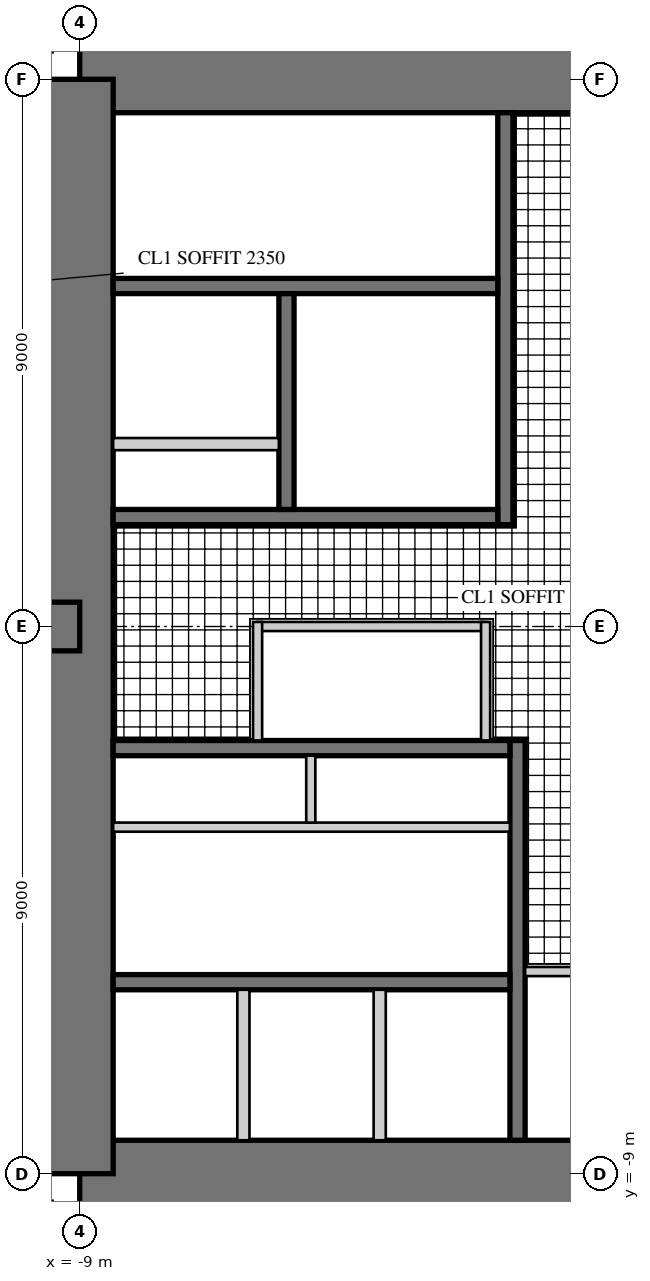
"""IFC4 building model, lengths in metres.
Left out: names, types, materials, properties, quantities, classifications, styles, units other than length and angle.
Written with IfcOpenShell. Run it as: python <this file> out.ifc"""

import sys

from ifc_helpers import new_model, si_unit, direction, frame, frame_2d, origin, place, context, subcontext, project, spatial, rectangle, extrude, element, fill, save


model = new_model("IFC4")
c1 = context("Model", 3, precision=1e-05, world=origin(), true_north=direction((0.0, 1.0)))
c2 = subcontext(c1, "Body", "Model", "MODEL_VIEW")
j1 = project(units=[si_unit("LENGTHUNIT", "METRE"), si_unit("PLANEANGLEUNIT", "RADIAN")], contexts=[c1])
p1 = place(None, origin())
s1 = spatial("IfcSite", under=j1, at=p1, CompositionType="ELEMENT")
p2 = place(p1, origin())
s2 = spatial("IfcBuilding", under=s1, at=p2, CompositionType="ELEMENT")
p3 = place(p2, frame((0.0, 0.0, 179.7)))
s3 = spatial("IfcBuildingStorey", under=s2, at=p3, CompositionType="ELEMENT", Elevation=179.7)
p4 = place(p3, frame((9.0, 9.0, 0.0), z_axis=(0.0, 0.0, 1.0), x_axis=(-1.0, 0.0, 0.0)))
e1 = element("IfcWall", 1, at=p4, inside=s3, PredefinedType="SHEAR", context=c2, shape_type="SweptSolid", body=[
    extrude(rectangle(XDim=18.0, YDim=1.1, at=frame_2d((9.0, 0.0))), origin(), (0.0, 0.0, 1.0), 3.4),
])
p5 = place(p4, frame((9.8, 0.0, 0.0)))
e2 = element("IfcOpeningElement", 2, at=p5, cuts=e1, PredefinedType="OPENING", context=c2, shape_type="SweptSolid", body=[
    extrude(rectangle(XDim=1.0, YDim=2.4, at=frame_2d((0.5, 1.2))), frame((0.0, 0.56, 0.0), z_axis=(0.0, -1.0, 0.0), x_axis=(1.0, 0.0, 0.0)), (0.0, 0.0, 1.0), 1.12),
])
p6 = place(p3, frame((-9.0, -9.0, 0.0), z_axis=(0.0, 0.0, 1.0), x_axis=(1.0, 0.0, 0.0)))
e3 = element("IfcWall", 3, at=p6, inside=s3, PredefinedType="SHEAR", context=c2, shape_type="SweptSolid", body=[
    extrude(rectangle(XDim=18.0, YDim=1.1, at=frame_2d((9.0, 0.0))), origin(), (0.0, 0.0, 1.0), 3.4),
])
p7 = place(p6, frame((9.8, 0.0, 0.0)))
e4 = element("IfcOpeningElement", 4, at=p7, cuts=e3, PredefinedType="OPENING", context=c2, shape_type="SweptSolid", body=[
    extrude(rectangle(XDim=1.0, YDim=2.4, at=frame_2d((0.5, 1.2))), frame((0.0, 0.56, 0.0), z_axis=(0.0, -1.0, 0.0), x_axis=(1.0, 0.0, 0.0)), (0.0, 0.0, 1.0), 1.12),
])
p8 = place(p3, frame((-9.0, 9.0, 0.0), z_axis=(0.0, 0.0, 1.0), x_axis=(0.0, -1.0, 0.0)))
e5 = element("IfcWall", 5, at=p8, inside=s3, PredefinedType="SHEAR", context=c2, shape_type="SweptSolid", body=[
    extrude(rectangle(XDim=18.0, YDim=1.1, at=frame_2d((9.0, 0.0))), origin(), (0.0, 0.0, 1.0), 3.4),
])
p9 = place(p8, frame((9.8, 0.0, 0.0)))
e6 = element("IfcOpeningElement", 6, at=p9, cuts=e5, PredefinedType="OPENING", context=c2, shape_type="SweptSolid", body=[
    extrude(rectangle(XDim=1.0, YDim=2.4, at=frame_2d((0.5, 1.2))), frame((0.0, 0.56, 0.0), z_axis=(0.0, -1.0, 0.0), x_axis=(1.0, 0.0, 0.0)), (0.0, 0.0, 1.0), 1.12),
])
p10 = place(p3, frame((-2.0, 1.675, 0.0), z_axis=(0.0, 0.0, 1.0), x_axis=(0.0, 1.0, 0.0)))
e7 = element("IfcWall", 7, at=p10, inside=s3, PredefinedType="SHEAR", context=c2, shape_type="SweptSolid", body=[
    extrude(rectangle(XDim=6.775, YDim=0.25, at=frame_2d((3.387, 0.0))), origin(), (0.0, 0.0, 1.0), 3.4),
])
p11 = place(p10, frame((0.725, 0.0, 0.0)))
e8 = element("IfcOpeningElement", 8, at=p11, cuts=e7, PredefinedType="OPENING", context=c2, shape_type="SweptSolid", body=[
    extrude(rectangle(XDim=1.0, YDim=2.1, at=frame_2d((0.5, 1.05))), frame((0.0, 0.135, 0.0), z_axis=(0.0, -1.0, 0.0), x_axis=(1.0, 0.0, 0.0)), (0.0, 0.0, 1.0), 0.27),
])
p12 = place(p3, frame((-2.125, 1.8, 0.0), z_axis=(0.0, 0.0, 1.0), x_axis=(-1.0, 0.0, 0.0)))
e9 = element("IfcWall", 9, at=p12, inside=s3, PredefinedType="SHEAR", context=c2, shape_type="SweptSolid", body=[
    extrude(rectangle(XDim=6.325, YDim=0.25, at=frame_2d((3.163, 0.0))), origin(), (0.0, 0.0, 1.0), 3.4),
])
p13 = place(p3, frame((-2.125, 5.6, 0.0), z_axis=(0.0, 0.0, 1.0), x_axis=(-1.0, 0.0, 0.0)))
e10 = element("IfcWall", 10, at=p13, inside=s3, PredefinedType="SHEAR", context=c2, shape_type="SweptSolid", body=[
    extrude(rectangle(XDim=6.325, YDim=0.25, at=frame_2d((3.163, 0.0))), origin(), (0.0, 0.0, 1.0), 3.4),
])
p14 = place(p13, frame((0.175, 0.0, 0.0)))
e11 = element("IfcOpeningElement", 11, at=p14, cuts=e10, PredefinedType="OPENING", context=c2, shape_type="SweptSolid", body=[
    extrude(rectangle(XDim=1.0, YDim=2.1, at=frame_2d((0.5, 1.05))), frame((0.0, 0.135, 0.0), z_axis=(0.0, -1.0, 0.0), x_axis=(1.0, 0.0, 0.0)), (0.0, 0.0, 1.0), 0.27),
])
p15 = place(p3, frame((-5.6, 1.925, 0.0), z_axis=(0.0, 0.0, 1.0), x_axis=(0.0, 1.0, 0.0)))
e12 = element("IfcWall", 12, at=p15, inside=s3, PredefinedType="SHEAR", context=c2, shape_type="SweptSolid", body=[
    extrude(rectangle(XDim=3.55, YDim=0.25, at=frame_2d((1.775, 0.0))), origin(), (0.0, 0.0, 1.0), 3.4),
])
p16 = place(p15, frame((1.525, 0.0, 0.0)))
e13 = element("IfcOpeningElement", 13, at=p16, cuts=e12, PredefinedType="OPENING", context=c2, shape_type="SweptSolid", body=[
    extrude(rectangle(XDim=1.1, YDim=2.2, at=frame_2d((0.55, 1.1))), frame((0.0, 0.135, 0.0), z_axis=(0.0, -1.0, 0.0), x_axis=(1.0, 0.0, 0.0)), (0.0, 0.0, 1.0), 0.27),
])
p17 = place(p15, frame((0.075, 0.0, 0.0)))
e14 = element("IfcOpeningElement", 14, at=p17, cuts=e12, PredefinedType="OPENING", context=c2, shape_type="SweptSolid", body=[
    extrude(rectangle(XDim=0.8, YDim=2.1, at=frame_2d((0.4, 1.05))), frame((0.0, 0.135, 0.0), z_axis=(0.0, -1.0, 0.0), x_axis=(1.0, 0.0, 0.0)), (0.0, 0.0, 1.0), 0.27),
])
p18 = place(p3, frame((-5.725, 3.0, 0.0), z_axis=(0.0, 0.0, 1.0), x_axis=(-1.0, 0.0, 0.0)))
e15 = element("IfcWall", 15, at=p18, inside=s3, PredefinedType="PARTITIONING", context=c2, shape_type="SweptSolid", body=[
    extrude(rectangle(XDim=2.725, YDim=0.2, at=frame_2d((1.362, 0.0))), origin(), (0.0, 0.0, 1.0), 3.4),
])
p19 = place(p3, frame((-1.8, -1.875, 0.0), z_axis=(0.0, 0.0, 1.0), x_axis=(0.0, -1.0, 0.0)))
e16 = element("IfcWall", 16, at=p19, inside=s3, PredefinedType="SHEAR", context=c2, shape_type="SweptSolid", body=[
    extrude(rectangle(XDim=6.575, YDim=0.25, at=frame_2d((3.288, 0.0))), origin(), (0.0, 0.0, 1.0), 3.4),
])
p20 = place(p19, frame((1.875, 0.0, 0.0)))
e17 = element("IfcOpeningElement", 17, at=p20, cuts=e16, PredefinedType="OPENING", context=c2, shape_type="SweptSolid", body=[
    extrude(rectangle(XDim=1.6, YDim=2.4, at=frame_2d((0.8, 1.2))), frame((0.0, 0.135, 0.0), z_axis=(0.0, -1.0, 0.0), x_axis=(1.0, 0.0, 0.0)), (0.0, 0.0, 1.0), 0.27),
])
p21 = place(p3, frame((-1.925, -2.0, 0.0), z_axis=(0.0, 0.0, 1.0), x_axis=(-1.0, 0.0, 0.0)))
e18 = element("IfcWall", 18, at=p21, inside=s3, PredefinedType="SHEAR", context=c2, shape_type="SweptSolid", body=[
    extrude(rectangle(XDim=6.525, YDim=0.25, at=frame_2d((3.262, 0.0))), origin(), (0.0, 0.0, 1.0), 3.4),
])
p22 = place(p3, frame((-1.925, -5.85, 0.0), z_axis=(0.0, 0.0, 1.0), x_axis=(-1.0, 0.0, 0.0)))
e19 = element("IfcWall", 19, at=p22, inside=s3, PredefinedType="SHEAR", context=c2, shape_type="SweptSolid", body=[
    extrude(rectangle(XDim=6.525, YDim=0.25, at=frame_2d((3.262, 0.0))), origin(), (0.0, 0.0, 1.0), 3.4),
])
p23 = place(p22, frame((0.471, 0.0, 0.0)))
e20 = element("IfcOpeningElement", 20, at=p23, cuts=e19, PredefinedType="OPENING", context=c2, shape_type="SweptSolid", body=[
    extrude(rectangle(XDim=1.1, YDim=2.2, at=frame_2d((0.55, 1.1))), frame((0.0, 0.135, 0.0), z_axis=(0.0, -1.0, 0.0), x_axis=(1.0, 0.0, 0.0)), (0.0, 0.0, 1.0), 0.27),
])
p24 = place(p22, frame((2.712, 0.0, 0.0)))
e21 = element("IfcOpeningElement", 21, at=p24, cuts=e19, PredefinedType="OPENING", context=c2, shape_type="SweptSolid", body=[
    extrude(rectangle(XDim=1.1, YDim=2.2, at=frame_2d((0.55, 1.1))), frame((0.0, 0.135, 0.0), z_axis=(0.0, -1.0, 0.0), x_axis=(1.0, 0.0, 0.0)), (0.0, 0.0, 1.0), 0.27),
])
p25 = place(p22, frame((4.954, 0.0, 0.0)))
e22 = element("IfcOpeningElement", 22, at=p25, cuts=e19, PredefinedType="OPENING", context=c2, shape_type="SweptSolid", body=[
    extrude(rectangle(XDim=1.1, YDim=2.2, at=frame_2d((0.55, 1.1))), frame((0.0, 0.135, 0.0), z_axis=(0.0, -1.0, 0.0), x_axis=(1.0, 0.0, 0.0)), (0.0, 0.0, 1.0), 0.27),
])
p26 = place(p3, frame((-1.925, -3.3, 0.0), z_axis=(0.0, 0.0, 1.0), x_axis=(-1.0, 0.0, 0.0)))
e23 = element("IfcWall", 23, at=p26, inside=s3, PredefinedType="PARTITIONING", context=c2, shape_type="SweptSolid", body=[
    extrude(rectangle(XDim=6.525, YDim=0.15, at=frame_2d((3.262, 0.0))), origin(), (0.0, 0.0, 1.0), 3.4),
])
p27 = place(p26, frame((0.075, 0.0, 0.0)))
e24 = element("IfcOpeningElement", 24, at=p27, cuts=e23, PredefinedType="OPENING", context=c2, shape_type="SweptSolid", body=[
    extrude(rectangle(XDim=0.8, YDim=2.1, at=frame_2d((0.4, 1.05))), frame((0.0, 0.085, 0.0), z_axis=(0.0, -1.0, 0.0), x_axis=(1.0, 0.0, 0.0)), (0.0, 0.0, 1.0), 0.17),
])
p28 = place(p26, frame((3.675, 0.0, 0.0)))
e25 = element("IfcOpeningElement", 25, at=p28, cuts=e23, PredefinedType="OPENING", context=c2, shape_type="SweptSolid", body=[
    extrude(rectangle(XDim=0.8, YDim=2.1, at=frame_2d((0.4, 1.05))), frame((0.0, 0.085, 0.0), z_axis=(0.0, -1.0, 0.0), x_axis=(1.0, 0.0, 0.0)), (0.0, 0.0, 1.0), 0.17),
])
p29 = place(p3, frame((-5.2, -2.125, 0.0), z_axis=(0.0, 0.0, 1.0), x_axis=(0.0, -1.0, 0.0)))
e26 = element("IfcWall", 26, at=p29, inside=s3, PredefinedType="PARTITIONING", context=c2, shape_type="SweptSolid", body=[
    extrude(rectangle(XDim=1.1, YDim=0.15, at=frame_2d((0.55, 0.0))), origin(), (0.0, 0.0, 1.0), 3.4),
])
for number, where, z_axis, x_axis in (
    (27, (-4.067, -5.975, 0.0), (0.0, 0.0, 1.0), (0.0, -1.0, 0.0)),
    (28, (-6.308, -5.975, 0.0), (0.0, 0.0, 1.0), (0.0, -1.0, 0.0)),
):
    element("IfcWall", number, at=place(p3, frame(where, z_axis=z_axis, x_axis=x_axis)), inside=s3, PredefinedType="PARTITIONING", context=c2, shape_type="SweptSolid", body=[
        extrude(rectangle(XDim=2.475, YDim=0.2, at=frame_2d((1.237, 0.0))), origin(), (0.0, 0.0, 1.0), 3.4),
    ])
p30 = place(p3, frame((-9.0, 0.0, 0.0), z_axis=(0.0, 0.0, 1.0), x_axis=(-1.0, 0.0, 0.0)))
e29 = element("IfcWall", 29, at=p30, inside=s3, PredefinedType="SHEAR", context=c2, shape_type="SweptSolid", body=[
    extrude(rectangle(XDim=18.0, YDim=0.8, at=frame_2d((9.0, 0.0))), origin(), (0.0, 0.0, 1.0), 3.4),
])
p31 = place(p30, frame((3.95, 0.0, 0.0)))
e30 = element("IfcOpeningElement", 30, at=p31, cuts=e29, PredefinedType="OPENING", context=c2, shape_type="SweptSolid", body=[
    extrude(rectangle(XDim=1.0, YDim=2.15, at=frame_2d((0.5, 1.075))), frame((0.0, 0.41, 0.0), z_axis=(0.0, -1.0, 0.0), x_axis=(1.0, 0.0, 0.0)), (0.0, 0.0, 1.0), 0.82),
])
p32 = place(p30, frame((6.6, 0.0, 0.0)))
e31 = element("IfcOpeningElement", 31, at=p32, cuts=e29, PredefinedType="OPENING", context=c2, shape_type="SweptSolid", body=[
    extrude(rectangle(XDim=1.0, YDim=2.15, at=frame_2d((0.5, 1.075))), frame((0.0, 0.41, 0.0), z_axis=(0.0, -1.0, 0.0), x_axis=(1.0, 0.0, 0.0)), (0.0, 0.0, 1.0), 0.82),
])
p33 = place(p30, frame((13.25, 0.0, 0.0)))
e32 = element("IfcOpeningElement", 32, at=p33, cuts=e29, PredefinedType="OPENING", context=c2, shape_type="SweptSolid", body=[
    extrude(rectangle(XDim=1.0, YDim=2.2, at=frame_2d((0.5, 1.1))), frame((0.0, 0.41, 0.0), z_axis=(0.0, -1.0, 0.0), x_axis=(1.0, 0.0, 0.0)), (0.0, 0.0, 1.0), 0.82),
])
p34 = place(p3, frame((-9.445, 9.57, 0.0), z_axis=(0.0, 0.0, 1.0), x_axis=(-1.0, 0.0, 0.0)))
e33 = element("IfcWall", 33, at=p34, inside=s3, PredefinedType="SOLIDWALL", context=c2, shape_type="SweptSolid", body=[
    extrude(rectangle(XDim=3.125, YDim=0.25, at=frame_2d((1.562, 0.0))), origin(), (0.0, 0.0, 1.0), 3.22),
])
p35 = place(p34, frame((0.6, 0.0, 0.0)))
e34 = element("IfcOpeningElement", 34, at=p35, cuts=e33, PredefinedType="OPENING", context=c2, shape_type="SweptSolid", body=[
    extrude(rectangle(XDim=1.0, YDim=2.2, at=frame_2d((0.5, 1.1))), frame((0.0, 0.135, 0.0), z_axis=(0.0, -1.0, 0.0), x_axis=(1.0, 0.0, 0.0)), (0.0, 0.0, 1.0), 0.27),
])
p36 = place(p3, frame((-9.57, -9.445, 0.0), z_axis=(0.0, 0.0, 1.0), x_axis=(0.0, -1.0, 0.0)))
e35 = element("IfcWall", 35, at=p36, inside=s3, PredefinedType="SOLIDWALL", context=c2, shape_type="SweptSolid", body=[
    extrude(rectangle(XDim=3.125, YDim=0.25, at=frame_2d((1.562, 0.0))), origin(), (0.0, 0.0, 1.0), 3.22),
])
p37 = place(p36, frame((0.6, 0.0, 0.0)))
e36 = element("IfcOpeningElement", 36, at=p37, cuts=e35, PredefinedType="OPENING", context=c2, shape_type="SweptSolid", body=[
    extrude(rectangle(XDim=1.0, YDim=2.2, at=frame_2d((0.5, 1.1))), frame((0.0, 0.135, 0.0), z_axis=(0.0, -1.0, 0.0), x_axis=(1.0, 0.0, 0.0)), (0.0, 0.0, 1.0), 0.27),
])
p38 = place(p3, frame((-2.325, 0.0, 0.0), z_axis=(0.0, 0.0, 1.0), x_axis=(-1.0, 0.0, 0.0)))
e37 = element("IfcWall", 37, at=p38, inside=s3, PredefinedType="PARTITIONING", context=c2, shape_type="SweptSolid", body=[
    extrude(rectangle(XDim=3.75, YDim=0.15, at=frame_2d((1.875, 0.0))), origin(), (0.0, 0.0, 1.0), 3.22),
])
p39 = place(p38, frame((0.4, 0.0, 0.0)))
e38 = element("IfcOpeningElement", 38, at=p39, cuts=e37, PredefinedType="OPENING", context=c2, shape_type="SweptSolid", body=[
    extrude(rectangle(XDim=1.0, YDim=2.1, at=frame_2d((0.5, 1.05))), frame((0.0, 0.085, 0.0), z_axis=(0.0, -1.0, 0.0), x_axis=(1.0, 0.0, 0.0)), (0.0, 0.0, 1.0), 0.17),
])
for number, where, z_axis, x_axis in (
    (39, (-2.325, -1.875, 0.0), (0.0, 0.0, 1.0), (0.0, 1.0, 0.0)),
    (40, (-6.075, 0.075, 0.0), (0.0, 0.0, 1.0), (0.0, -1.0, 0.0)),
):
    element("IfcWall", number, at=place(p3, frame(where, z_axis=z_axis, x_axis=x_axis)), inside=s3, PredefinedType="PARTITIONING", context=c2, shape_type="SweptSolid", body=[
        extrude(rectangle(XDim=1.95, YDim=0.15, at=frame_2d((0.975, 0.0))), origin(), (0.0, 0.0, 1.0), 3.22),
    ])
p40 = place(p3, frame((-1.675, -5.675, 0.0), z_axis=(0.0, 0.0, 1.0), x_axis=(1.0, 0.0, 0.0)))
e41 = element("IfcWall", 41, at=p40, inside=s3, PredefinedType="PARTITIONING", context=c2, shape_type="SweptSolid", body=[
    extrude(rectangle(XDim=1.75, YDim=0.15, at=frame_2d((0.875, 0.0))), origin(), (0.0, 0.0, 1.0), 3.22),
])
p41 = place(p39, origin())
e42 = element("IfcDoor", 42, at=p41, inside=s3, OperationType="SINGLE_SWING_LEFT", PredefinedType="DOOR", context=c2, shape_type="SweptSolid", body=[
    extrude(rectangle(XDim=1.0, YDim=2.1, at=frame_2d((0.5, 1.05))), frame((0.0, 0.025, 0.0), z_axis=(0.0, -1.0, 0.0), x_axis=(1.0, 0.0, 0.0)), (0.0, 0.0, 1.0), 0.05),
])
fill(e38, e42)
p42 = place(p5, origin())
e43 = element("IfcDoor", 43, at=p42, inside=s3, OperationType="SINGLE_SWING_RIGHT", PredefinedType="DOOR", context=c2, shape_type="SweptSolid", body=[
    extrude(rectangle(XDim=1.0, YDim=2.4, at=frame_2d((0.5, 1.2))), frame((0.0, 0.055, 0.0), z_axis=(0.0, -1.0, 0.0), x_axis=(1.0, 0.0, 0.0)), (0.0, 0.0, 1.0), 0.05),
])
fill(e2, e43)
p43 = place(p9, origin())
e44 = element("IfcDoor", 44, at=p43, inside=s3, OperationType="SINGLE_SWING_RIGHT", PredefinedType="DOOR", context=c2, shape_type="SweptSolid", body=[
    extrude(rectangle(XDim=1.0, YDim=2.4, at=frame_2d((0.5, 1.2))), frame((0.0, 0.055, 0.0), z_axis=(0.0, -1.0, 0.0), x_axis=(1.0, 0.0, 0.0)), (0.0, 0.0, 1.0), 0.05),
])
fill(e6, e44)
p44 = place(p11, origin())
e45 = element("IfcDoor", 45, at=p44, inside=s3, OperationType="SINGLE_SWING_LEFT", PredefinedType="DOOR", context=c2, shape_type="SweptSolid", body=[
    extrude(rectangle(XDim=1.0, YDim=2.1, at=frame_2d((0.5, 1.05))), frame((0.0, 0.025, 0.0), z_axis=(0.0, -1.0, 0.0), x_axis=(1.0, 0.0, 0.0)), (0.0, 0.0, 1.0), 0.05),
])
fill(e8, e45)
p45 = place(p14, frame((1.0, 0.0, 0.0), z_axis=(0.0, 0.0, 1.0), x_axis=(-1.0, 0.0, 0.0)))
e46 = element("IfcDoor", 46, at=p45, inside=s3, OperationType="SINGLE_SWING_RIGHT", PredefinedType="DOOR", context=c2, shape_type="SweptSolid", body=[
    extrude(rectangle(XDim=1.0, YDim=2.1, at=frame_2d((0.5, 1.05))), frame((0.0, 0.025, 0.0), z_axis=(0.0, -1.0, 0.0), x_axis=(1.0, 0.0, 0.0)), (0.0, 0.0, 1.0), 0.05),
])
fill(e11, e46)
p46 = place(p16, origin())
e47 = element("IfcDoor", 47, at=p46, inside=s3, OperationType="DOUBLE_DOOR_SLIDING", PredefinedType="DOOR", context=c2, shape_type="SweptSolid", body=[
    extrude(rectangle(XDim=1.1, YDim=2.2, at=frame_2d((0.55, 1.1))), frame((0.0, 0.025, 0.0), z_axis=(0.0, -1.0, 0.0), x_axis=(1.0, 0.0, 0.0)), (0.0, 0.0, 1.0), 0.05),
])
fill(e13, e47)
p47 = place(p17, origin())
e48 = element("IfcDoor", 48, at=p47, inside=s3, OperationType="SINGLE_SWING_LEFT", PredefinedType="DOOR", context=c2, shape_type="SweptSolid", body=[
    extrude(rectangle(XDim=0.8, YDim=2.1, at=frame_2d((0.4, 1.05))), frame((0.0, 0.025, 0.0), z_axis=(0.0, -1.0, 0.0), x_axis=(1.0, 0.0, 0.0)), (0.0, 0.0, 1.0), 0.05),
])
fill(e14, e48)
p48 = place(p23, origin())
e49 = element("IfcDoor", 49, at=p48, inside=s3, OperationType="DOUBLE_DOOR_SLIDING", PredefinedType="DOOR", context=c2, shape_type="SweptSolid", body=[
    extrude(rectangle(XDim=1.1, YDim=2.2, at=frame_2d((0.55, 1.1))), frame((0.0, 0.025, 0.0), z_axis=(0.0, -1.0, 0.0), x_axis=(1.0, 0.0, 0.0)), (0.0, 0.0, 1.0), 0.05),
])
fill(e20, e49)
p49 = place(p24, origin())
e50 = element("IfcDoor", 50, at=p49, inside=s3, OperationType="DOUBLE_DOOR_SLIDING", PredefinedType="DOOR", context=c2, shape_type="SweptSolid", body=[
    extrude(rectangle(XDim=1.1, YDim=2.2, at=frame_2d((0.55, 1.1))), frame((0.0, 0.025, 0.0), z_axis=(0.0, -1.0, 0.0), x_axis=(1.0, 0.0, 0.0)), (0.0, 0.0, 1.0), 0.05),
])
fill(e21, e50)
p50 = place(p25, origin())
e51 = element("IfcDoor", 51, at=p50, inside=s3, OperationType="DOUBLE_DOOR_SLIDING", PredefinedType="DOOR", context=c2, shape_type="SweptSolid", body=[
    extrude(rectangle(XDim=1.1, YDim=2.2, at=frame_2d((0.55, 1.1))), frame((0.0, 0.025, 0.0), z_axis=(0.0, -1.0, 0.0), x_axis=(1.0, 0.0, 0.0)), (0.0, 0.0, 1.0), 0.05),
])
fill(e22, e51)
p51 = place(p20, origin())
e52 = element("IfcDoor", 52, at=p51, inside=s3, OperationType="DOUBLE_DOOR_DOUBLE_SWING", PredefinedType="DOOR", context=c2, shape_type="SweptSolid", body=[
    extrude(rectangle(XDim=1.6, YDim=2.4, at=frame_2d((0.8, 1.2))), frame((0.0, 0.025, 0.0), z_axis=(0.0, -1.0, 0.0), x_axis=(1.0, 0.0, 0.0)), (0.0, 0.0, 1.0), 0.05),
])
fill(e17, e52)
p52 = place(p27, frame((0.8, 0.0, 0.0), z_axis=(0.0, 0.0, 1.0), x_axis=(-1.0, 0.0, 0.0)))
e53 = element("IfcDoor", 53, at=p52, inside=s3, OperationType="SINGLE_SWING_RIGHT", PredefinedType="DOOR", context=c2, shape_type="SweptSolid", body=[
    extrude(rectangle(XDim=0.8, YDim=2.1, at=frame_2d((0.4, 1.05))), frame((0.0, 0.025, 0.0), z_axis=(0.0, -1.0, 0.0), x_axis=(1.0, 0.0, 0.0)), (0.0, 0.0, 1.0), 0.05),
])
fill(e24, e53)
p53 = place(p28, frame((0.8, 0.0, 0.0), z_axis=(0.0, 0.0, 1.0), x_axis=(-1.0, 0.0, 0.0)))
e54 = element("IfcDoor", 54, at=p53, inside=s3, OperationType="SINGLE_SWING_RIGHT", PredefinedType="DOOR", context=c2, shape_type="SweptSolid", body=[
    extrude(rectangle(XDim=0.8, YDim=2.1, at=frame_2d((0.4, 1.05))), frame((0.0, 0.025, 0.0), z_axis=(0.0, -1.0, 0.0), x_axis=(1.0, 0.0, 0.0)), (0.0, 0.0, 1.0), 0.05),
])
fill(e25, e54)
save(model, sys.argv[1])
